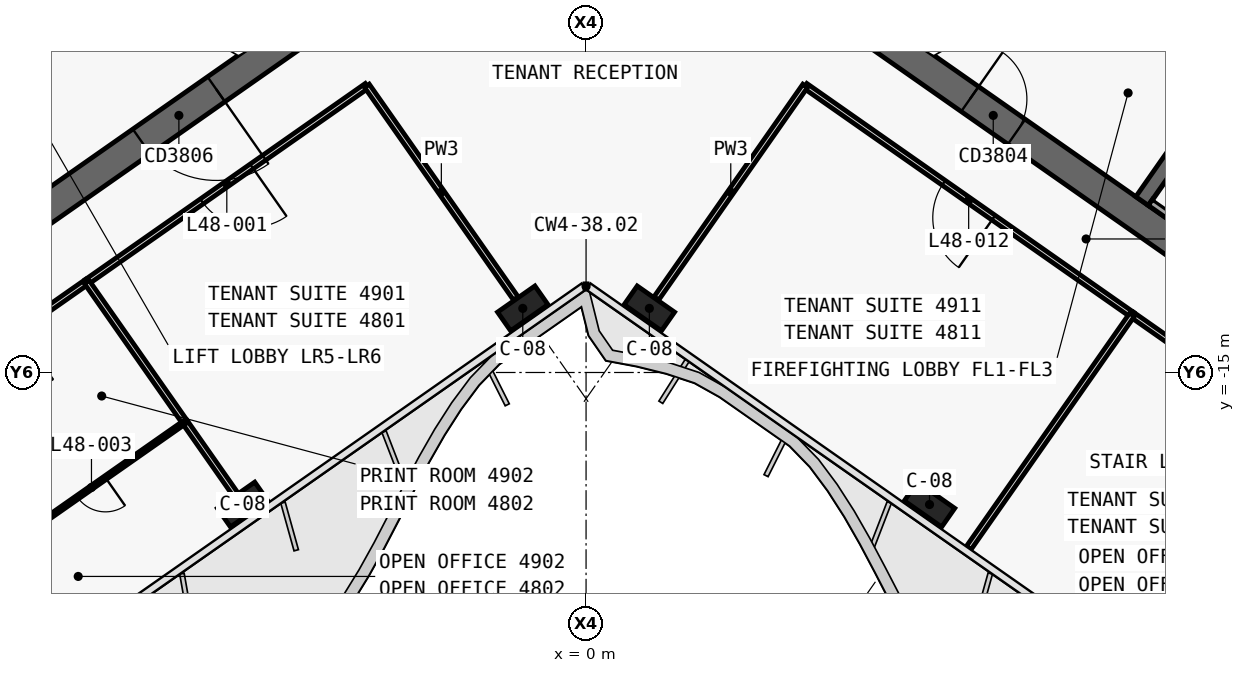
"""IFC4 building model, lengths in metres.
Left out: names, types, materials, properties, quantities, classifications, styles, units other than length and angle.
Written with IfcOpenShell. Run it as: python <this file> out.ifc"""

import sys

from ifc_helpers import new_model, si_unit, direction, frame, frame_2d, origin, origin_2d, place, context, subcontext, project, spatial, polyline, rectangle, outline, extrude, element, fill, save


model = new_model("IFC4")
c1 = context("Model", 3, precision=1e-05, world=origin(), true_north=direction((0.0, 1.0)))
c2 = subcontext(c1, "Body", "Model", "MODEL_VIEW")
j1 = project(units=[si_unit("LENGTHUNIT", "METRE"), si_unit("PLANEANGLEUNIT", "RADIAN")], contexts=[c1])
p1 = place(None, origin())
s1 = spatial("IfcSite", under=j1, at=p1, CompositionType="ELEMENT")
p2 = place(p1, origin())
s2 = spatial("IfcBuilding", under=s1, at=p2, CompositionType="ELEMENT")
p3 = place(p2, frame((0.0, 0.0, 206.1)))
s3 = spatial("IfcBuildingStorey", under=s2, at=p3, CompositionType="ELEMENT", Elevation=206.1)
p4 = place(p3, frame((0.029, 11.984, 0.0), z_axis=(0.0, 0.0, 1.0), x_axis=(-0.819151382952, -0.573577380837, 0.0)))
e1 = element("IfcWall", 1, at=p4, inside=s3, PredefinedType="SHEAR", context=c2, shape_type="SweptSolid", body=[
    extrude(outline(polyline([(33.898, 0.4), (0.56, 0.4), (-0.0, -0.4), (33.898, -0.4), (33.898, 0.4)])), origin(), (0.0, 0.0, 1.0), 3.9),
])
p5 = place(p3, frame((0.029, -0.712, 0.0), z_axis=(0.0, 0.0, 1.0), x_axis=(-0.819151758019, -0.573576845187, 0.0)))
e2 = element("IfcWall", 2, at=p5, inside=s3, PredefinedType="SHEAR", context=c2, shape_type="SweptSolid", body=[
    extrude(outline(polyline([(26.616, 0.4), (0.56, 0.4), (-0.0, -0.4), (26.616, -0.4), (26.616, 0.4)])), origin(), (0.0, 0.0, 1.0), 3.9),
])
p6 = place(p5, frame((2.966, 0.0, 0.0)))
e3 = element("IfcOpeningElement", 3, at=p6, cuts=e2, PredefinedType="OPENING", context=c2, shape_type="SweptSolid", body=[
    extrude(rectangle(XDim=2.4, YDim=2.1, at=frame_2d((1.2, 1.05))), frame((0.0, 0.41, 0.0), z_axis=(0.0, -1.0, 0.0), x_axis=(1.0, 0.0, 0.0)), (0.0, 0.0, 1.0), 0.82),
])
p7 = place(p5, frame((11.916, 0.0, 0.0)))
e4 = element("IfcOpeningElement", 4, at=p7, cuts=e2, PredefinedType="OPENING", context=c2, shape_type="SweptSolid", body=[
    extrude(rectangle(XDim=2.4, YDim=2.1, at=frame_2d((1.2, 1.05))), frame((0.0, 0.41, 0.0), z_axis=(0.0, -1.0, 0.0), x_axis=(1.0, 0.0, 0.0)), (0.0, 0.0, 1.0), 0.82),
])
p8 = place(p3, frame((-2.638, 3.768, 0.0), z_axis=(0.0, 0.0, 1.0), x_axis=(-0.81915267502, -0.573575535572, 0.0)))
e5 = element("IfcWall", 5, at=p8, inside=s3, PredefinedType="SHEAR", context=c2, shape_type="SweptSolid", body=[
    extrude(outline(polyline([(26.2, 0.2), (0.0, 0.2), (0.0, -0.2), (26.2, -0.2), (26.2, 0.2)])), origin(), (0.0, 0.0, 1.0), 3.9),
])
p9 = place(p8, frame((1.169, 0.0, 0.0)))
e6 = element("IfcOpeningElement", 6, at=p9, cuts=e5, PredefinedType="OPENING", context=c2, shape_type="SweptSolid", body=[
    extrude(rectangle(XDim=1.1, YDim=2.1, at=frame_2d((0.55, 1.05))), frame((0.0, 0.21, 0.0), z_axis=(0.0, -1.0, 0.0), x_axis=(1.0, 0.0, 0.0)), (0.0, 0.0, 1.0), 0.42),
])
p10 = place(p8, frame((3.206, 0.0, 0.0)))
e7 = element("IfcOpeningElement", 7, at=p10, cuts=e5, PredefinedType="OPENING", context=c2, shape_type="SweptSolid", body=[
    extrude(rectangle(XDim=1.1, YDim=2.1, at=frame_2d((0.55, 1.05))), frame((0.0, 0.21, 0.0), z_axis=(0.0, -1.0, 0.0), x_axis=(1.0, 0.0, 0.0)), (0.0, 0.0, 1.0), 0.42),
])
p11 = place(p8, frame((5.244, 0.0, 0.0)))
e8 = element("IfcOpeningElement", 8, at=p11, cuts=e5, PredefinedType="OPENING", context=c2, shape_type="SweptSolid", body=[
    extrude(rectangle(XDim=1.1, YDim=2.1, at=frame_2d((0.55, 1.05))), frame((0.0, 0.21, 0.0), z_axis=(0.0, -1.0, 0.0), x_axis=(1.0, 0.0, 0.0)), (0.0, 0.0, 1.0), 0.42),
])
p12 = place(p8, frame((7.281, 0.0, 0.0)))
e9 = element("IfcOpeningElement", 9, at=p12, cuts=e5, PredefinedType="OPENING", context=c2, shape_type="SweptSolid", body=[
    extrude(rectangle(XDim=1.1, YDim=2.1, at=frame_2d((0.55, 1.05))), frame((0.0, 0.21, 0.0), z_axis=(0.0, -1.0, 0.0), x_axis=(1.0, 0.0, 0.0)), (0.0, 0.0, 1.0), 0.42),
])
p13 = place(p8, frame((9.688, 0.0, 0.0)))
e10 = element("IfcOpeningElement", 10, at=p13, cuts=e5, PredefinedType="OPENING", context=c2, shape_type="SweptSolid", body=[
    extrude(rectangle(XDim=1.1, YDim=2.1, at=frame_2d((0.55, 1.05))), frame((0.0, 0.21, 0.0), z_axis=(0.0, -1.0, 0.0), x_axis=(1.0, 0.0, 0.0)), (0.0, 0.0, 1.0), 0.42),
])
p14 = place(p8, frame((11.863, 0.0, 0.0)))
e11 = element("IfcOpeningElement", 11, at=p14, cuts=e5, PredefinedType="OPENING", context=c2, shape_type="SweptSolid", body=[
    extrude(rectangle(XDim=1.1, YDim=2.1, at=frame_2d((0.55, 1.05))), frame((0.0, 0.21, 0.0), z_axis=(0.0, -1.0, 0.0), x_axis=(1.0, 0.0, 0.0)), (0.0, 0.0, 1.0), 0.42),
])
p15 = place(p8, frame((14.552, 0.0, 0.0)))
e12 = element("IfcOpeningElement", 12, at=p15, cuts=e5, PredefinedType="OPENING", context=c2, shape_type="SweptSolid", body=[
    extrude(rectangle(XDim=1.0, YDim=2.1, at=frame_2d((0.5, 1.05))), frame((0.0, 0.21, 0.0), z_axis=(0.0, -1.0, 0.0), x_axis=(1.0, 0.0, 0.0)), (0.0, 0.0, 1.0), 0.42),
])
p16 = place(p8, frame((16.627, 0.0, 0.0)))
e13 = element("IfcOpeningElement", 13, at=p16, cuts=e5, PredefinedType="OPENING", context=c2, shape_type="SweptSolid", body=[
    extrude(rectangle(XDim=1.0, YDim=2.1, at=frame_2d((0.5, 1.05))), frame((0.0, 0.21, 0.0), z_axis=(0.0, -1.0, 0.0), x_axis=(1.0, 0.0, 0.0)), (0.0, 0.0, 1.0), 0.42),
])
p17 = place(p3, frame((-0.029, 11.984, 0.0), z_axis=(0.0, 0.0, 1.0), x_axis=(0.819151382952, -0.573577380837, 0.0)))
e14 = element("IfcWall", 14, at=p17, inside=s3, PredefinedType="SHEAR", context=c2, shape_type="SweptSolid", body=[
    extrude(outline(polyline([(33.898, 0.4), (-0.0, 0.4), (0.56, -0.4), (33.898, -0.4), (33.898, 0.4)])), origin(), (0.0, 0.0, 1.0), 3.9),
])
p18 = place(p3, frame((-0.029, -0.712, 0.0), z_axis=(0.0, 0.0, 1.0), x_axis=(0.819151758019, -0.573576845187, 0.0)))
e15 = element("IfcWall", 15, at=p18, inside=s3, PredefinedType="SHEAR", context=c2, shape_type="SweptSolid", body=[
    extrude(outline(polyline([(26.616, 0.4), (-0.0, 0.4), (0.56, -0.4), (26.616, -0.4), (26.616, 0.4)])), origin(), (0.0, 0.0, 1.0), 3.9),
])
p19 = place(p18, frame((6.666, 0.0, 0.0)))
e16 = element("IfcOpeningElement", 16, at=p19, cuts=e15, PredefinedType="OPENING", context=c2, shape_type="SweptSolid", body=[
    extrude(rectangle(XDim=1.5, YDim=2.1, at=frame_2d((0.75, 1.05))), frame((0.0, 0.41, 0.0), z_axis=(0.0, -1.0, 0.0), x_axis=(1.0, 0.0, 0.0)), (0.0, 0.0, 1.0), 0.82),
])
p20 = place(p18, frame((12.366, 0.0, 0.0)))
e17 = element("IfcOpeningElement", 17, at=p20, cuts=e15, PredefinedType="OPENING", context=c2, shape_type="SweptSolid", body=[
    extrude(rectangle(XDim=1.5, YDim=2.1, at=frame_2d((0.75, 1.05))), frame((0.0, 0.41, 0.0), z_axis=(0.0, -1.0, 0.0), x_axis=(1.0, 0.0, 0.0)), (0.0, 0.0, 1.0), 0.82),
])
p21 = place(p3, frame((14.63, -10.488, 0.0), z_axis=(0.0, 0.0, 1.0), x_axis=(0.573611936273, 0.819127185829, 0.0)))
e18 = element("IfcWall", 18, at=p21, inside=s3, PredefinedType="SHEAR", context=c2, shape_type="SweptSolid", body=[
    extrude(outline(polyline([(0.0, 0.2), (0.0, -0.2), (4.6, -0.2), (4.6, 0.2), (0.0, 0.2)])), origin(), (0.0, 0.0, 1.0), 3.9),
])
p22 = place(p3, frame((2.638, 3.768, 0.0), z_axis=(0.0, 0.0, 1.0), x_axis=(0.81915267502, -0.573575535572, 0.0)))
e19 = element("IfcWall", 19, at=p22, inside=s3, PredefinedType="SHEAR", context=c2, shape_type="SweptSolid", body=[
    extrude(outline(polyline([(0.0, 0.2), (0.0, -0.2), (26.2, -0.2), (26.2, 0.2), (0.0, 0.2)])), origin(), (0.0, 0.0, 1.0), 3.9),
])
p23 = place(p22, frame((9.637, 0.0, 0.0)))
e20 = element("IfcOpeningElement", 20, at=p23, cuts=e19, PredefinedType="OPENING", context=c2, shape_type="SweptSolid", body=[
    extrude(rectangle(XDim=1.2, YDim=2.1, at=frame_2d((0.6, 1.05))), frame((0.0, 0.21, 0.0), z_axis=(0.0, -1.0, 0.0), x_axis=(1.0, 0.0, 0.0)), (0.0, 0.0, 1.0), 0.42),
])
p24 = place(p22, frame((11.812, 0.0, 0.0)))
e21 = element("IfcOpeningElement", 21, at=p24, cuts=e19, PredefinedType="OPENING", context=c2, shape_type="SweptSolid", body=[
    extrude(rectangle(XDim=1.2, YDim=2.1, at=frame_2d((0.6, 1.05))), frame((0.0, 0.21, 0.0), z_axis=(0.0, -1.0, 0.0), x_axis=(1.0, 0.0, 0.0)), (0.0, 0.0, 1.0), 0.42),
])
p25 = place(p22, frame((13.988, 0.0, 0.0)))
e22 = element("IfcOpeningElement", 22, at=p25, cuts=e19, PredefinedType="OPENING", context=c2, shape_type="SweptSolid", body=[
    extrude(rectangle(XDim=1.2, YDim=2.1, at=frame_2d((0.6, 1.05))), frame((0.0, 0.21, 0.0), z_axis=(0.0, -1.0, 0.0), x_axis=(1.0, 0.0, 0.0)), (0.0, 0.0, 1.0), 0.42),
])
p26 = place(p22, frame((16.262, 0.0, 0.0)))
e23 = element("IfcOpeningElement", 23, at=p26, cuts=e19, PredefinedType="OPENING", context=c2, shape_type="SweptSolid", body=[
    extrude(rectangle(XDim=1.0, YDim=2.1, at=frame_2d((0.5, 1.05))), frame((0.0, 0.21, 0.0), z_axis=(0.0, -1.0, 0.0), x_axis=(1.0, 0.0, 0.0)), (0.0, 0.0, 1.0), 0.42),
])
for number, where, z_axis, x_axis in (
    (24, (-1.665, -13.313, 0.0), (0.0, 0.0, 1.0), (-0.819, -0.574, 0.0)),
    (25, (-9.038, -18.475, 0.0), (0.0, 0.0, 1.0), (-0.819, -0.574, 0.0)),
    (26, (1.665, -13.313, 0.0), (0.0, 0.0, 1.0), (0.819, -0.574, 0.0)),
    (27, (9.038, -18.475, 0.0), (0.0, 0.0, 1.0), (0.819, -0.574, 0.0)),
):
    element("IfcColumn", number, at=place(p3, frame(where, z_axis=z_axis, x_axis=x_axis)), inside=s3, PredefinedType="COLUMN", context=c2, shape_type="SweptSolid", body=[
        extrude(rectangle(XDim=1.2, YDim=0.6, at=origin_2d()), origin(), (0.0, 0.0, 1.0), 3.9),
    ])
p27 = place(p3, frame((14.851, -10.521, 0.0), z_axis=(0.0, 0.0, 1.0), x_axis=(0.819141584393, -0.57359137434, 0.0)))
e28 = element("IfcWall", 28, at=p27, inside=s3, PredefinedType="SOLIDWALL", context=c2, shape_type="SweptSolid", body=[
    extrude(rectangle(XDim=8.0, YDim=0.2, at=frame_2d((4.0, 0.0))), origin(), (0.0, 0.0, 1.0), 3.62),
])
p28 = place(p3, frame((14.369, -13.479, 0.0), z_axis=(0.0, 0.0, 1.0), x_axis=(-0.819154371039, 0.573573113393, 0.0)))
e29 = element("IfcWall", 29, at=p28, inside=s3, PredefinedType="PARTITIONING", context=c2, shape_type="SweptSolid", body=[
    extrude(rectangle(XDim=10.502, YDim=0.15, at=frame_2d((5.251, 0.0))), origin(), (0.0, 0.0, 1.0), 3.0),
])
p29 = place(p28, frame((4.451, 0.0, 0.0)))
e30 = element("IfcOpeningElement", 30, at=p29, cuts=e29, PredefinedType="OPENING", context=c2, shape_type="SweptSolid", body=[
    extrude(rectangle(XDim=1.6, YDim=2.1, at=frame_2d((0.8, 1.05))), frame((0.0, 0.085, 0.0), z_axis=(0.0, -1.0, 0.0), x_axis=(1.0, 0.0, 0.0)), (0.0, 0.0, 1.0), 0.17),
])
p30 = place(p3, frame((20.513, -17.781, 0.0), z_axis=(0.0, 0.0, 1.0), x_axis=(-0.819164661457, 0.573558416746, 0.0)))
e31 = element("IfcWall", 31, at=p30, inside=s3, PredefinedType="PARTITIONING", context=c2, shape_type="SweptSolid", body=[
    extrude(rectangle(XDim=7.504, YDim=0.15, at=frame_2d((3.752, 0.0))), origin(), (0.0, 0.0, 1.0), 3.0),
])
p31 = place(p30, frame((2.952, 0.0, 0.0)))
e32 = element("IfcOpeningElement", 32, at=p31, cuts=e31, PredefinedType="OPENING", context=c2, shape_type="SweptSolid", body=[
    extrude(rectangle(XDim=1.6, YDim=2.1, at=frame_2d((0.8, 1.05))), frame((0.0, 0.085, 0.0), z_axis=(0.0, -1.0, 0.0), x_axis=(1.0, 0.0, 0.0)), (0.0, 0.0, 1.0), 0.17),
])
p32 = place(p3, frame((-5.766, -7.456, 0.0), z_axis=(0.0, 0.0, 1.0), x_axis=(-0.81915291695, -0.57357519006, 0.0)))
e33 = element("IfcWall", 33, at=p32, inside=s3, PredefinedType="PARTITIONING", context=c2, shape_type="SweptSolid", body=[
    extrude(rectangle(XDim=9.002, YDim=0.15, at=frame_2d((4.501, 0.0))), origin(), (0.0, 0.0, 1.0), 3.0),
])
p33 = place(p32, frame((3.701, 0.0, 0.0)))
e34 = element("IfcOpeningElement", 34, at=p33, cuts=e33, PredefinedType="OPENING", context=c2, shape_type="SweptSolid", body=[
    extrude(rectangle(XDim=1.6, YDim=2.1, at=frame_2d((0.8, 1.05))), frame((0.0, 0.085, 0.0), z_axis=(0.0, -1.0, 0.0), x_axis=(1.0, 0.0, 0.0)), (0.0, 0.0, 1.0), 0.17),
])
p34 = place(p3, frame((-13.137, -12.617, 0.0), z_axis=(0.0, 0.0, 1.0), x_axis=(-0.819165052243, -0.573557858619, 0.0)))
e35 = element("IfcWall", 35, at=p34, inside=s3, PredefinedType="PARTITIONING", context=c2, shape_type="SweptSolid", body=[
    extrude(rectangle(XDim=6.004, YDim=0.15, at=frame_2d((3.002, 0.0))), origin(), (0.0, 0.0, 1.0), 3.0),
])
p35 = place(p34, frame((2.202, 0.0, 0.0)))
e36 = element("IfcOpeningElement", 36, at=p35, cuts=e35, PredefinedType="OPENING", context=c2, shape_type="SweptSolid", body=[
    extrude(rectangle(XDim=1.6, YDim=2.1, at=frame_2d((0.8, 1.05))), frame((0.0, 0.085, 0.0), z_axis=(0.0, -1.0, 0.0), x_axis=(1.0, 0.0, 0.0)), (0.0, 0.0, 1.0), 0.17),
])
p36 = place(p3, frame((14.367, -13.479, 0.0), z_axis=(0.0, 0.0, 1.0), x_axis=(-0.573575945067, -0.81915238829, 0.0)))
e37 = element("IfcWall", 37, at=p36, inside=s3, PredefinedType="PARTITIONING", context=c2, shape_type="SweptSolid", body=[
    extrude(rectangle(XDim=7.5, YDim=0.15, at=frame_2d((3.75, 0.0))), origin(), (0.0, 0.0, 1.0), 2.9),
])
p37 = place(p3, frame((1.849, -13.051, 0.0), z_axis=(0.0, 0.0, 1.0), x_axis=(0.573577493031, 0.819151304393, 0.0)))
e38 = element("IfcWall", 38, at=p37, inside=s3, PredefinedType="PARTITIONING", context=c2, shape_type="SweptSolid", body=[
    extrude(rectangle(XDim=6.83, YDim=0.15, at=frame_2d((3.415, 0.0))), origin(), (0.0, 0.0, 1.0), 3.0),
])
p38 = place(p3, frame((-1.849, -13.051, 0.0), z_axis=(0.0, 0.0, 1.0), x_axis=(-0.57357985571, 0.819149650018, 0.0)))
e39 = element("IfcWall", 39, at=p38, inside=s3, PredefinedType="PARTITIONING", context=c2, shape_type="SweptSolid", body=[
    extrude(rectangle(XDim=6.832, YDim=0.15, at=frame_2d((3.416, 0.0))), origin(), (0.0, 0.0, 1.0), 3.0),
])
p39 = place(p3, frame((-9.221, -18.213, 0.0), z_axis=(0.0, 0.0, 1.0), x_axis=(-0.573553724287, 0.819167946978, 0.0)))
e40 = element("IfcWall", 40, at=p39, inside=s3, PredefinedType="PARTITIONING", context=c2, shape_type="SweptSolid", body=[
    extrude(rectangle(XDim=2.331, YDim=0.15, at=frame_2d((1.166, 0.0))), origin(), (0.0, 0.0, 1.0), 3.0),
])
p40 = place(p3, frame((-10.556, -16.306, 0.0), z_axis=(0.0, 0.0, 1.0), x_axis=(-0.573564243949, 0.819160581365, 0.0)))
e41 = element("IfcWall", 41, at=p40, inside=s3, PredefinedType="PARTITIONING", context=c2, shape_type="SweptSolid", body=[
    extrude(rectangle(XDim=4.502, YDim=0.15, at=frame_2d((2.251, 0.0))), origin(), (0.0, 0.0, 1.0), 3.0),
])
p41 = place(p3, frame((-10.557, -16.305, 0.0), z_axis=(0.0, 0.0, 1.0), x_axis=(-0.819130592339, -0.573607071691, 0.0)))
e42 = element("IfcWall", 42, at=p41, inside=s3, PredefinedType="PARTITIONING", context=c2, shape_type="SweptSolid", body=[
    extrude(rectangle(XDim=6.0, YDim=0.1, at=frame_2d((3.0, 0.0))), origin(), (0.0, 0.0, 1.0), 3.0),
])
p42 = place(p41, frame((2.55, 0.0, 0.0)))
e43 = element("IfcOpeningElement", 43, at=p42, cuts=e42, PredefinedType="OPENING", context=c2, shape_type="SweptSolid", body=[
    extrude(rectangle(XDim=0.9, YDim=2.1, at=frame_2d((0.45, 1.05))), frame((0.0, 0.06, 0.0), z_axis=(0.0, -1.0, 0.0), x_axis=(1.0, 0.0, 0.0)), (0.0, 0.0, 1.0), 0.12),
])
p43 = place(p3, frame((-13.752, -22.203, 0.0), z_axis=(0.0, 0.0, 1.0), x_axis=(-0.57356715775, 0.819158541157, 0.0)))
e44 = element("IfcWall", 44, at=p43, inside=s3, PredefinedType="PARTITIONING", context=c2, shape_type="SweptSolid", body=[
    extrude(rectangle(XDim=2.501, YDim=0.15, at=frame_2d((1.25, 0.0))), origin(), (0.0, 0.0, 1.0), 2.9),
])
p44 = place(p7, origin())
e45 = element("IfcDoor", 45, at=p44, inside=s3, OperationType="DOUBLE_DOOR_SINGLE_SWING", PredefinedType="DOOR", context=c2, shape_type="SweptSolid", body=[
    extrude(rectangle(XDim=2.4, YDim=2.1, at=frame_2d((1.2, 1.05))), frame((0.0, 0.025, 0.0), z_axis=(0.0, -1.0, 0.0), x_axis=(1.0, 0.0, 0.0)), (0.0, 0.0, 1.0), 0.05),
])
fill(e4, e45)
p45 = place(p20, origin())
e46 = element("IfcDoor", 46, at=p45, inside=s3, OperationType="DOUBLE_DOOR_SINGLE_SWING", PredefinedType="DOOR", context=c2, shape_type="SweptSolid", body=[
    extrude(rectangle(XDim=1.5, YDim=2.1, at=frame_2d((0.75, 1.05))), frame((0.0, 0.025, 0.0), z_axis=(0.0, -1.0, 0.0), x_axis=(1.0, 0.0, 0.0)), (0.0, 0.0, 1.0), 0.05),
])
fill(e17, e46)
p46 = place(p33, origin())
e47 = element("IfcDoor", 47, at=p46, inside=s3, OperationType="DOUBLE_DOOR_SINGLE_SWING", PredefinedType="DOOR", context=c2, shape_type="SweptSolid", body=[
    extrude(rectangle(XDim=1.6, YDim=2.1, at=frame_2d((0.8, 1.05))), frame((0.0, 0.025, 0.0), z_axis=(0.0, -1.0, 0.0), x_axis=(1.0, 0.0, 0.0)), (0.0, 0.0, 1.0), 0.05),
])
fill(e34, e47)
p47 = place(p42, origin())
e48 = element("IfcDoor", 48, at=p47, inside=s3, OperationType="SINGLE_SWING_LEFT", PredefinedType="DOOR", context=c2, shape_type="SweptSolid", body=[
    extrude(rectangle(XDim=0.9, YDim=2.1, at=frame_2d((0.45, 1.05))), frame((0.0, 0.025, 0.0), z_axis=(0.0, -1.0, 0.0), x_axis=(1.0, 0.0, 0.0)), (0.0, 0.0, 1.0), 0.05),
])
fill(e43, e48)
p48 = place(p29, origin())
e49 = element("IfcDoor", 49, at=p48, inside=s3, OperationType="DOUBLE_DOOR_SINGLE_SWING", PredefinedType="DOOR", context=c2, shape_type="SweptSolid", body=[
    extrude(rectangle(XDim=1.6, YDim=2.1, at=frame_2d((0.8, 1.05))), frame((0.0, 0.025, 0.0), z_axis=(0.0, -1.0, 0.0), x_axis=(1.0, 0.0, 0.0)), (0.0, 0.0, 1.0), 0.05),
])
fill(e30, e49)
save(model, sys.argv[1])
